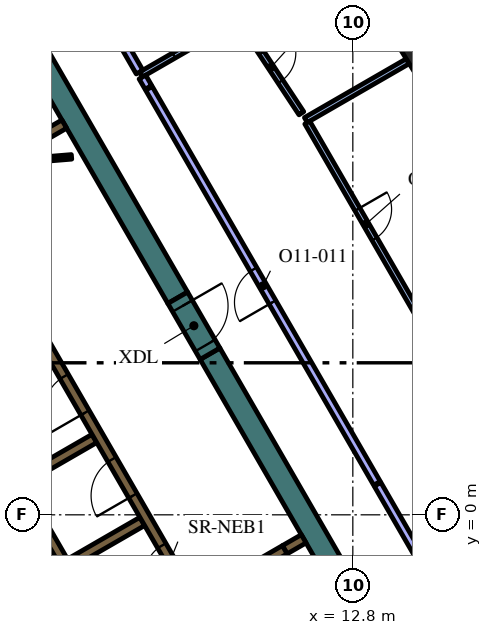
"""IFC4 building model, lengths in metres.
Left out: names, types, materials, properties, quantities, classifications, styles, units other than length and angle.
Written with IfcOpenShell. Run it as: python <this file> out.ifc"""

import sys

from ifc_helpers import new_model, si_unit, direction, frame, frame_2d, origin, origin_2d, place, context, subcontext, project, spatial, rectangle, extrude, element, fill, save


model = new_model("IFC4")
c1 = context("Model", 3, precision=1e-05, world=origin(), true_north=direction((0.0, 1.0)))
c2 = subcontext(c1, "Body", "Model", "MODEL_VIEW")
j1 = project(units=[si_unit("LENGTHUNIT", "METRE"), si_unit("PLANEANGLEUNIT", "RADIAN")], contexts=[c1])
p1 = place(None, origin())
s1 = spatial("IfcSite", under=j1, at=p1, CompositionType="ELEMENT")
p2 = place(p1, origin())
s2 = spatial("IfcBuilding", under=s1, at=p2, CompositionType="ELEMENT")
p3 = place(p2, frame((0.0, 0.0, 275.4)))
s3 = spatial("IfcBuildingStorey", under=s2, at=p3, CompositionType="ELEMENT", Elevation=275.4)
p4 = place(p3, frame((14.556, 12.098, 0.0), z_axis=(0.0, 0.0, 1.0), x_axis=(-0.525609744083, 0.850725805959, 0.0)))
e1 = element("IfcColumn", 1, at=p4, inside=s3, PredefinedType="COLUMN", context=c2, shape_type="SweptSolid", body=[
    extrude(rectangle(XDim=1.0, YDim=0.7, at=origin_2d()), origin(), (0.0, 0.0, 1.0), 4.2),
])
for number, where, z_axis, x_axis in (
    (2, (9.042, 4.239, 0.0), (0.0, 0.0, 1.0), (0.5, -0.866, 0.0)),
    (3, (1.989, 16.456, 0.0), (0.0, 0.0, 1.0), (0.5, -0.866, 0.0)),
):
    element("IfcWall", number, at=place(p3, frame(where, z_axis=z_axis, x_axis=x_axis)), inside=s3, PredefinedType="SOLIDWALL", context=c2, shape_type="SweptSolid", body=[
        extrude(rectangle(XDim=12.406, YDim=0.6, at=frame_2d((6.203, 0.0))), origin(), (0.0, 0.0, 1.0), 4.2),
    ])
p5 = place(p3, frame((11.507, -0.631, 0.0), z_axis=(0.0, 0.0, 1.0), x_axis=(-0.866093731455, -0.499881634324, 0.0)))
e4 = element("IfcWall", 4, at=p5, inside=s3, PredefinedType="SOLIDWALL", context=c2, shape_type="SweptSolid", body=[
    extrude(rectangle(XDim=0.575, YDim=0.25, at=frame_2d((0.288, 0.0))), origin(), (0.0, 0.0, 1.0), 4.2),
])
p6 = place(p3, frame((5.97, -2.591, 0.0), z_axis=(0.0, 0.0, 1.0), x_axis=(-0.499994469932, 0.866028596547, 0.0)))
e5 = element("IfcWall", 5, at=p6, inside=s3, PredefinedType="SOLIDWALL", context=c2, shape_type="SweptSolid", body=[
    extrude(rectangle(XDim=10.488, YDim=0.25, at=frame_2d((5.244, 0.0))), origin(), (0.0, 0.0, 1.0), 4.2),
])
for number, where, z_axis, x_axis in (
    (6, (4.094, 0.909, 0.0), (0.0, 0.0, 1.0), (0.866, 0.5, 0.0)),
    (7, (5.354, -1.274, 0.0), (0.0, 0.0, 1.0), (0.866, 0.5, 0.0)),
):
    element("IfcWall", number, at=place(p3, frame(where, z_axis=z_axis, x_axis=x_axis)), inside=s3, PredefinedType="SOLIDWALL", context=c2, shape_type="SweptSolid", body=[
        extrude(rectangle(XDim=2.2, YDim=0.25, at=frame_2d((1.1, 0.0))), origin(), (0.0, 0.0, 1.0), 4.2),
    ])
p7 = place(p3, frame((3.83, 9.486, 0.0), z_axis=(0.0, 0.0, 1.0), x_axis=(0.865986202621, 0.500067892261, 0.0)))
e8 = element("IfcWall", 8, at=p7, inside=s3, PredefinedType="SOLIDWALL", context=c2, shape_type="SweptSolid", body=[
    extrude(rectangle(XDim=1.591, YDim=0.25, at=frame_2d((0.795, 0.0))), origin(), (0.0, 0.0, 1.0), 4.2),
])
p8 = place(p3, frame((8.565, -2.185, 0.0), z_axis=(0.0, 0.0, 1.0), x_axis=(-0.499997954832, 0.866026584559, 0.0)))
e9 = element("IfcWall", 9, at=p8, inside=s3, PredefinedType="SOLIDWALL", context=c2, shape_type="SweptSolid", body=[
    extrude(rectangle(XDim=12.35, YDim=0.25, at=frame_2d((6.175, 0.0))), origin(), (0.0, 0.0, 1.0), 4.2),
])
p9 = place(p8, frame((0.685, 0.0, 0.0)))
e10 = element("IfcOpeningElement", 10, at=p9, cuts=e9, PredefinedType="OPENING", context=c2, shape_type="SweptSolid", body=[
    extrude(rectangle(XDim=0.9, YDim=2.1, at=frame_2d((0.45, 1.05))), frame((0.0, 0.135, 0.0), z_axis=(0.0, -1.0, 0.0), x_axis=(1.0, 0.0, 0.0)), (0.0, 0.0, 1.0), 0.27),
])
p10 = place(p8, frame((3.105, 0.0, 0.0)))
e11 = element("IfcOpeningElement", 11, at=p10, cuts=e9, PredefinedType="OPENING", context=c2, shape_type="SweptSolid", body=[
    extrude(rectangle(XDim=1.1, YDim=2.1, at=frame_2d((0.55, 1.05))), frame((0.0, 0.135, 0.0), z_axis=(0.0, -1.0, 0.0), x_axis=(1.0, 0.0, 0.0)), (0.0, 0.0, 1.0), 0.27),
])
p11 = place(p8, frame((5.625, 0.0, 0.0)))
e12 = element("IfcOpeningElement", 12, at=p11, cuts=e9, PredefinedType="OPENING", context=c2, shape_type="SweptSolid", body=[
    extrude(rectangle(XDim=1.1, YDim=2.1, at=frame_2d((0.55, 1.05))), frame((0.0, 0.135, 0.0), z_axis=(0.0, -1.0, 0.0), x_axis=(1.0, 0.0, 0.0)), (0.0, 0.0, 1.0), 0.27),
])
p12 = place(p8, frame((8.145, 0.0, 0.0)))
e13 = element("IfcOpeningElement", 13, at=p12, cuts=e9, PredefinedType="OPENING", context=c2, shape_type="SweptSolid", body=[
    extrude(rectangle(XDim=1.1, YDim=2.1, at=frame_2d((0.55, 1.05))), frame((0.0, 0.135, 0.0), z_axis=(0.0, -1.0, 0.0), x_axis=(1.0, 0.0, 0.0)), (0.0, 0.0, 1.0), 0.27),
])
p13 = place(p8, frame((10.665, 0.0, 0.0)))
e14 = element("IfcOpeningElement", 14, at=p13, cuts=e9, PredefinedType="OPENING", context=c2, shape_type="SweptSolid", body=[
    extrude(rectangle(XDim=1.1, YDim=2.1, at=frame_2d((0.55, 1.05))), frame((0.0, 0.135, 0.0), z_axis=(0.0, -1.0, 0.0), x_axis=(1.0, 0.0, 0.0)), (0.0, 0.0, 1.0), 0.27),
])
p14 = place(p3, frame((5.398, 9.419, 0.0), z_axis=(0.0, 0.0, 1.0), x_axis=(-0.996653416376, -0.081743303248, 0.0)))
e15 = element("IfcWall", 15, at=p14, inside=s3, PredefinedType="PARTITIONING", context=c2, shape_type="SweptSolid", body=[
    extrude(rectangle(XDim=2.7, YDim=0.12, at=frame_2d((1.35, 0.0))), origin(), (0.0, 0.0, 1.0), 3.55),
])
p15 = place(p14, frame((1.45, 0.0, 0.0)))
e16 = element("IfcOpeningElement", 16, at=p15, cuts=e15, PredefinedType="OPENING", context=c2, shape_type="SweptSolid", body=[
    extrude(rectangle(XDim=0.9, YDim=2.1, at=frame_2d((0.45, 1.05))), frame((0.0, 0.07, 0.0), z_axis=(0.0, -1.0, 0.0), x_axis=(1.0, 0.0, 0.0)), (0.0, 0.0, 1.0), 0.14),
])
p16 = place(p3, frame((11.009, -0.919, 0.0), z_axis=(0.0, 0.0, 1.0), x_axis=(-0.866059744384, -0.49994051562, 0.0)))
e17 = element("IfcWall", 17, at=p16, inside=s3, PredefinedType="SOLIDWALL", context=c2, shape_type="SweptSolid", body=[
    extrude(rectangle(XDim=2.1, YDim=0.25, at=frame_2d((1.05, 0.0))), origin(), (0.0, 0.0, 1.0), 4.2),
])
p17 = place(p16, frame((0.45, 0.0, 0.0)))
e18 = element("IfcOpeningElement", 18, at=p17, cuts=e17, PredefinedType="OPENING", context=c2, shape_type="SweptSolid", body=[
    extrude(rectangle(XDim=1.2, YDim=2.1, at=frame_2d((0.6, 1.05))), frame((0.0, 0.135, 0.0), z_axis=(0.0, -1.0, 0.0), x_axis=(1.0, 0.0, 0.0)), (0.0, 0.0, 1.0), 0.27),
])
p18 = place(p3, frame((8.192, 5.711, 0.0), z_axis=(0.0, 0.0, 1.0), x_axis=(0.500062241894, -0.865989465428, 0.0)))
e19 = element("IfcWall", 19, at=p18, inside=s3, PredefinedType="SOLIDWALL", context=c2, shape_type="SweptSolid", body=[
    extrude(rectangle(XDim=1.7, YDim=0.6, at=frame_2d((0.85, 0.0))), origin(), (0.0, 0.0, 1.0), 4.2),
])
p19 = place(p18, frame((0.25, 0.0, 0.0)))
e20 = element("IfcOpeningElement", 20, at=p19, cuts=e19, PredefinedType="OPENING", context=c2, shape_type="SweptSolid", body=[
    extrude(rectangle(XDim=1.2, YDim=2.1, at=frame_2d((0.6, 1.05))), frame((0.0, 0.31, 0.0), z_axis=(0.0, -1.0, 0.0), x_axis=(1.0, 0.0, 0.0)), (0.0, 0.0, 1.0), 0.62),
])
p20 = place(p3, frame((11.564, 10.387, 0.0), z_axis=(0.0, 0.0, 1.0), x_axis=(0.86604641216, 0.499963610661, 0.0)))
e21 = element("IfcWall", 21, at=p20, inside=s3, PredefinedType="PARTITIONING", context=c2, shape_type="SweptSolid", body=[
    extrude(rectangle(XDim=3.096, YDim=0.15, at=frame_2d((1.548, 0.0))), origin(), (0.0, 0.0, 1.0), 3.55),
])
p21 = place(p3, frame((11.602, 10.322, 0.0), z_axis=(0.0, 0.0, 1.0), x_axis=(0.499989914735, -0.866031226437, 0.0)))
e22 = element("IfcWall", 22, at=p21, inside=s3, PredefinedType="PARTITIONING", context=c2, shape_type="SweptSolid", body=[
    extrude(rectangle(XDim=6.137, YDim=0.15, at=frame_2d((3.068, 0.0))), origin(), (0.0, 0.0, 1.0), 3.55),
])
p22 = place(p21, frame((2.637, 0.0, 0.0)))
e23 = element("IfcOpeningElement", 23, at=p22, cuts=e22, PredefinedType="OPENING", context=c2, shape_type="SweptSolid", body=[
    extrude(rectangle(XDim=0.9, YDim=2.1, at=frame_2d((0.45, 1.05))), frame((0.0, 0.085, 0.0), z_axis=(0.0, -1.0, 0.0), x_axis=(1.0, 0.0, 0.0)), (0.0, 0.0, 1.0), 0.17),
])
p23 = place(p3, frame((9.795, 13.068, 0.0), z_axis=(0.0, 0.0, 1.0), x_axis=(0.550767347659, -0.834658809786, 0.0)))
e24 = element("IfcWall", 24, at=p23, inside=s3, PredefinedType="PARTITIONING", context=c2, shape_type="SweptSolid", body=[
    extrude(rectangle(XDim=2.999, YDim=0.15, at=frame_2d((1.5, 0.0))), origin(), (0.0, 0.0, 1.0), 3.55),
])
p24 = place(p23, frame((1.099, 0.0, 0.0)))
e25 = element("IfcOpeningElement", 25, at=p24, cuts=e24, PredefinedType="OPENING", context=c2, shape_type="SweptSolid", body=[
    extrude(rectangle(XDim=0.9, YDim=2.1, at=frame_2d((0.45, 1.05))), frame((0.0, 0.085, 0.0), z_axis=(0.0, -1.0, 0.0), x_axis=(1.0, 0.0, 0.0)), (0.0, 0.0, 1.0), 0.17),
])
p25 = place(p3, frame((7.226, 11.585, 0.0), z_axis=(0.0, 0.0, 1.0), x_axis=(0.866021079084, 0.500007490527, 0.0)))
e26 = element("IfcWall", 26, at=p25, inside=s3, PredefinedType="PARTITIONING", context=c2, shape_type="SweptSolid", body=[
    extrude(rectangle(XDim=2.892, YDim=0.15, at=frame_2d((1.446, 0.0))), origin(), (0.0, 0.0, 1.0), 3.55),
])
p26 = place(p25, frame((1.0, 0.0, 0.0)))
e27 = element("IfcOpeningElement", 27, at=p26, cuts=e26, PredefinedType="OPENING", context=c2, shape_type="SweptSolid", body=[
    extrude(rectangle(XDim=0.9, YDim=2.1, at=frame_2d((0.45, 1.05))), frame((0.0, 0.085, 0.0), z_axis=(0.0, -1.0, 0.0), x_axis=(1.0, 0.0, 0.0)), (0.0, 0.0, 1.0), 0.17),
])
p27 = place(p3, frame((13.436, 0.829, 0.0), z_axis=(0.0, 0.0, 1.0), x_axis=(-0.49999894854, 0.866026010844, 0.0)))
e28 = element("IfcWall", 28, at=p27, inside=s3, PredefinedType="PARTITIONING", context=c2, shape_type="SweptSolid", body=[
    extrude(rectangle(XDim=12.0, YDim=0.2, at=frame_2d((6.0, 0.0))), origin(), (0.0, 0.0, 1.0), 3.55),
])
p28 = place(p27, frame((5.5, 0.0, 0.0)))
e29 = element("IfcOpeningElement", 29, at=p28, cuts=e28, PredefinedType="OPENING", context=c2, shape_type="SweptSolid", body=[
    extrude(rectangle(XDim=1.0, YDim=2.1, at=frame_2d((0.5, 1.05))), frame((0.0, 0.11, 0.0), z_axis=(0.0, -1.0, 0.0), x_axis=(1.0, 0.0, 0.0)), (0.0, 0.0, 1.0), 0.22),
])
p29 = place(p3, frame((7.421, 11.247, 0.0), z_axis=(0.0, 0.0, 1.0), x_axis=(-0.500303403544, 0.865850162789, 0.0)))
e30 = element("IfcWall", 30, at=p29, inside=s3, PredefinedType="PARTITIONING", context=c2, shape_type="SweptSolid", body=[
    extrude(rectangle(XDim=0.315, YDim=0.2, at=frame_2d((0.158, 0.0))), origin(), (0.0, 0.0, 1.0), 3.55),
])
p30 = place(p3, frame((17.565, -6.324, 0.0), z_axis=(0.0, 0.0, 1.0), x_axis=(-0.499977548053, 0.866038366034, 0.0)))
e31 = element("IfcWall", 31, at=p30, inside=s3, PredefinedType="PARTITIONING", context=c2, shape_type="SweptSolid", body=[
    extrude(rectangle(XDim=8.229, YDim=0.2, at=frame_2d((4.115, 0.0))), origin(), (0.0, 0.0, 1.0), 3.55),
])
p31 = place(p3, frame((7.188, 11.65, 0.0), z_axis=(0.0, 0.0, 1.0), x_axis=(-0.499989634868, 0.866031388014, 0.0)))
e32 = element("IfcWall", 32, at=p31, inside=s3, PredefinedType="PARTITIONING", context=c2, shape_type="SweptSolid", body=[
    extrude(rectangle(XDim=7.303, YDim=0.2, at=frame_2d((3.652, 0.0))), origin(), (0.0, 0.0, 1.0), 3.55),
])
p32 = place(p9, origin())
e33 = element("IfcDoor", 33, at=p32, inside=s3, OperationType="SINGLE_SWING_LEFT", PredefinedType="DOOR", context=c2, shape_type="SweptSolid", body=[
    extrude(rectangle(XDim=0.9, YDim=2.1, at=frame_2d((0.45, 1.05))), frame((0.0, 0.025, 0.0), z_axis=(0.0, -1.0, 0.0), x_axis=(1.0, 0.0, 0.0)), (0.0, 0.0, 1.0), 0.05),
])
fill(e10, e33)
p33 = place(p10, origin())
e34 = element("IfcDoor", 34, at=p33, inside=s3, OperationType="DOUBLE_DOOR_SLIDING", PredefinedType="DOOR", context=c2, shape_type="SweptSolid", body=[
    extrude(rectangle(XDim=1.1, YDim=2.1, at=frame_2d((0.55, 1.05))), frame((0.0, 0.025, 0.0), z_axis=(0.0, -1.0, 0.0), x_axis=(1.0, 0.0, 0.0)), (0.0, 0.0, 1.0), 0.05),
])
fill(e11, e34)
p34 = place(p11, origin())
e35 = element("IfcDoor", 35, at=p34, inside=s3, OperationType="DOUBLE_DOOR_SLIDING", PredefinedType="DOOR", context=c2, shape_type="SweptSolid", body=[
    extrude(rectangle(XDim=1.1, YDim=2.1, at=frame_2d((0.55, 1.05))), frame((0.0, 0.025, 0.0), z_axis=(0.0, -1.0, 0.0), x_axis=(1.0, 0.0, 0.0)), (0.0, 0.0, 1.0), 0.05),
])
fill(e12, e35)
p35 = place(p19, origin())
e36 = element("IfcDoor", 36, at=p35, inside=s3, OperationType="SINGLE_SWING_LEFT", PredefinedType="DOOR", context=c2, shape_type="SweptSolid", body=[
    extrude(rectangle(XDim=1.2, YDim=2.1, at=frame_2d((0.6, 1.05))), frame((0.0, 0.025, 0.0), z_axis=(0.0, -1.0, 0.0), x_axis=(1.0, 0.0, 0.0)), (0.0, 0.0, 1.0), 0.05),
])
fill(e20, e36)
p36 = place(p22, origin())
e37 = element("IfcDoor", 37, at=p36, inside=s3, OperationType="SINGLE_SWING_RIGHT", PredefinedType="DOOR", context=c2, shape_type="SweptSolid", body=[
    extrude(rectangle(XDim=0.9, YDim=2.1, at=frame_2d((0.45, 1.05))), frame((0.0, 0.025, 0.0), z_axis=(0.0, -1.0, 0.0), x_axis=(1.0, 0.0, 0.0)), (0.0, 0.0, 1.0), 0.05),
])
fill(e23, e37)
p37 = place(p24, origin())
e38 = element("IfcDoor", 38, at=p37, inside=s3, OperationType="SINGLE_SWING_RIGHT", PredefinedType="DOOR", context=c2, shape_type="SweptSolid", body=[
    extrude(rectangle(XDim=0.9, YDim=2.1, at=frame_2d((0.45, 1.05))), frame((0.0, 0.025, 0.0), z_axis=(0.0, -1.0, 0.0), x_axis=(1.0, 0.0, 0.0)), (0.0, 0.0, 1.0), 0.05),
])
fill(e25, e38)
p38 = place(p28, origin())
e39 = element("IfcDoor", 39, at=p38, inside=s3, OperationType="SINGLE_SWING_RIGHT", PredefinedType="DOOR", context=c2, shape_type="SweptSolid", body=[
    extrude(rectangle(XDim=1.0, YDim=2.1, at=frame_2d((0.5, 1.05))), frame((0.0, 0.025, 0.0), z_axis=(0.0, -1.0, 0.0), x_axis=(1.0, 0.0, 0.0)), (0.0, 0.0, 1.0), 0.05),
])
fill(e29, e39)
p39 = place(p26, origin())
e40 = element("IfcDoor", 40, at=p39, inside=s3, OperationType="SINGLE_SWING_RIGHT", PredefinedType="DOOR", context=c2, shape_type="SweptSolid", body=[
    extrude(rectangle(XDim=0.9, YDim=2.1, at=frame_2d((0.45, 1.05))), frame((0.0, 0.025, 0.0), z_axis=(0.0, -1.0, 0.0), x_axis=(1.0, 0.0, 0.0)), (0.0, 0.0, 1.0), 0.05),
])
fill(e27, e40)
save(model, sys.argv[1])
